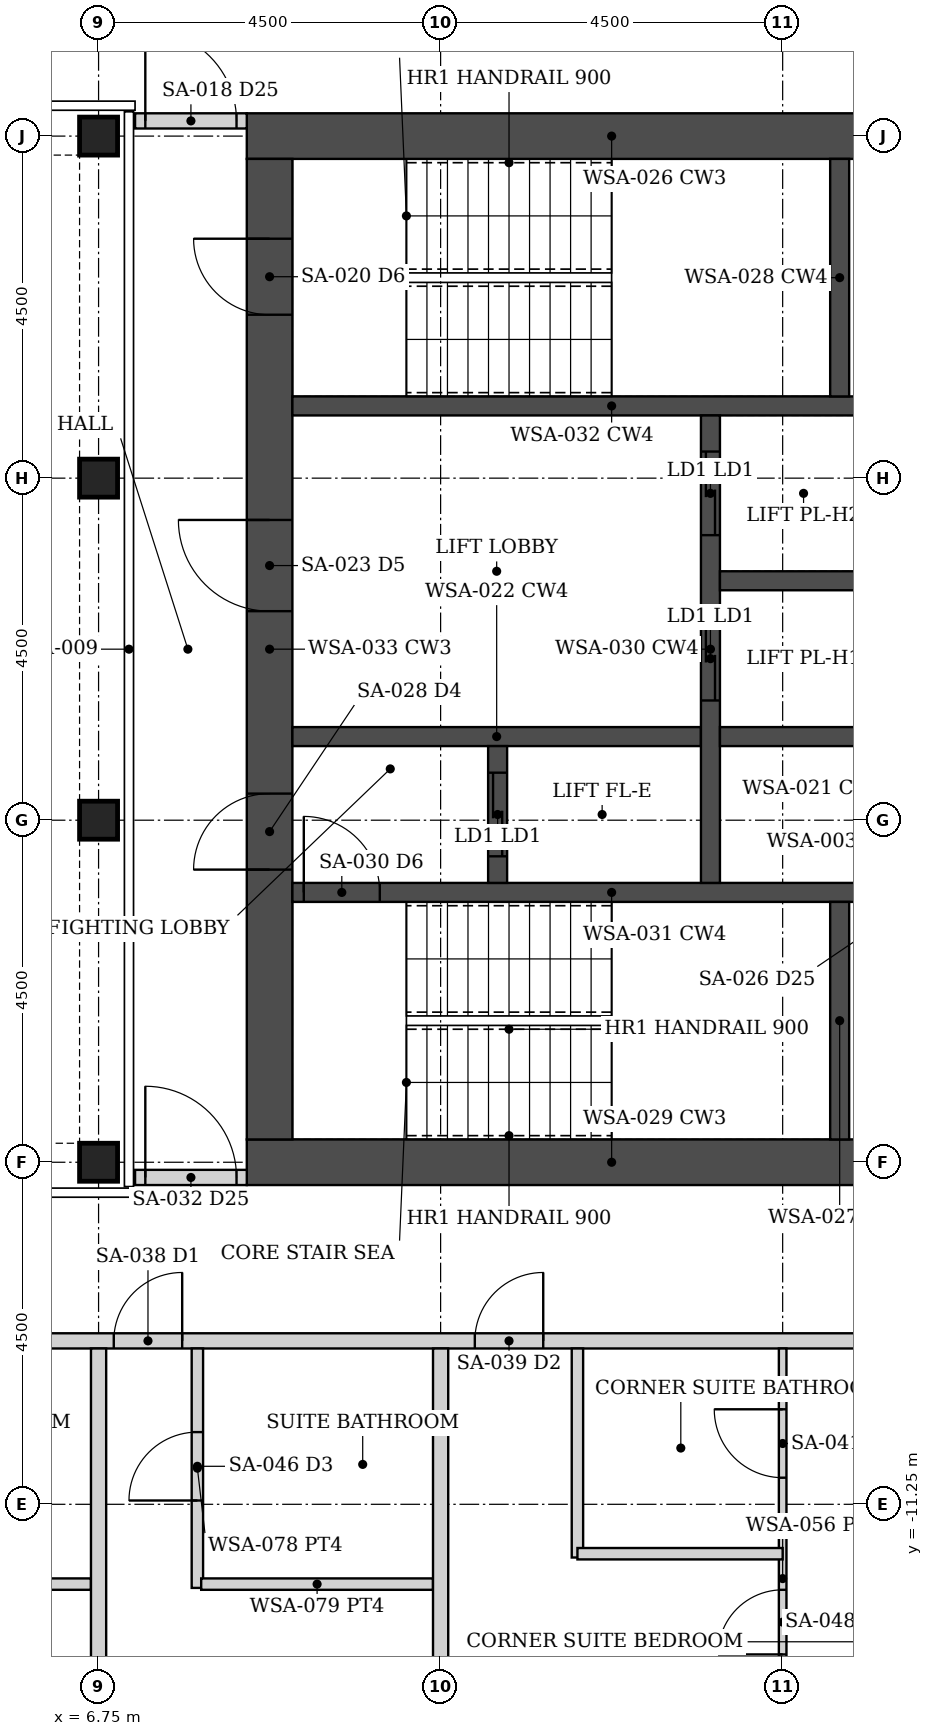
"""IFC4 building model, lengths in metres.
Left out: names, types, materials, properties, quantities, classifications, styles, units other than length and angle.
Written with IfcOpenShell. Run it as: python <this file> out.ifc"""

import sys

from ifc_helpers import new_model, si_unit, direction, frame, frame_2d, origin, origin_2d, place, context, subcontext, project, spatial, rectangle, hollow_rectangle, extrude, element, fill, save


model = new_model("IFC4")
c1 = context("Model", 3, precision=1e-05, world=origin(), true_north=direction((0.0, 1.0)))
c2 = subcontext(c1, "Body", "Model", "MODEL_VIEW")
j1 = project(units=[si_unit("LENGTHUNIT", "METRE"), si_unit("PLANEANGLEUNIT", "RADIAN")], contexts=[c1])
p1 = place(None, origin())
s1 = spatial("IfcSite", under=j1, at=p1, CompositionType="ELEMENT")
p2 = place(p1, origin())
s2 = spatial("IfcBuilding", under=s1, at=p2, CompositionType="ELEMENT")
p3 = place(p2, frame((0.0, 0.0, 200.8)))
s3 = spatial("IfcBuildingStorey", under=s2, at=p3, CompositionType="ELEMENT", Elevation=200.8)
for number, where, z_axis, x_axis in (
    (1, (6.75, -6.75, 0.0), (0.0, 0.0, 1.0), (1.0, 0.0, 0.0)),
    (2, (6.75, -2.25, 0.0), (0.0, 0.0, 1.0), (1.0, 0.0, 0.0)),
    (3, (6.75, 2.25, 0.0), (0.0, 0.0, 1.0), (1.0, 0.0, 0.0)),
    (4, (6.75, 6.75, 0.0), (0.0, 0.0, 1.0), (1.0, 0.0, 0.0)),
):
    element("IfcColumn", number, at=place(p3, frame(where, z_axis=z_axis, x_axis=x_axis)), inside=s3, PredefinedType="COLUMN", context=c2, shape_type="SweptSolid", body=[
        extrude(hollow_rectangle(XDim=0.5, YDim=0.5, WallThickness=0.03, at=origin_2d()), origin(), (0.0, 0.0, 1.0), 3.75),
    ])
for number, where, z_axis, x_axis in (
    (5, (8.7, -6.75, 0.0), (0.0, 0.0, 1.0), (1.0, 0.0, 0.0)),
    (6, (8.7, 6.75, 0.0), (0.0, 0.0, 1.0), (1.0, 0.0, 0.0)),
):
    element("IfcWall", number, at=place(p3, frame(where, z_axis=z_axis, x_axis=x_axis)), inside=s3, PredefinedType="SHEAR", context=c2, shape_type="SweptSolid", body=[
        extrude(rectangle(XDim=9.6, YDim=0.6, at=frame_2d((4.8, 0.0))), origin(), (0.0, 0.0, 1.0), 3.75),
    ])
p4 = place(p3, frame((9.0, -6.45, 0.0), z_axis=(0.0, 0.0, 1.0), x_axis=(0.0, 1.0, 0.0)))
e7 = element("IfcWall", 7, at=p4, inside=s3, PredefinedType="SHEAR", context=c2, shape_type="SweptSolid", body=[
    extrude(rectangle(XDim=12.9, YDim=0.6, at=frame_2d((6.45, 0.0))), origin(), (0.0, 0.0, 1.0), 3.75),
])
p5 = place(p4, frame((3.55, 0.0, 0.0)))
e8 = element("IfcOpeningElement", 8, at=p5, cuts=e7, PredefinedType="OPENING", context=c2, shape_type="SweptSolid", body=[
    extrude(rectangle(XDim=1.0, YDim=2.1, at=frame_2d((0.5, 1.05))), frame((0.0, 0.31, 0.0), z_axis=(0.0, -1.0, 0.0), x_axis=(1.0, 0.0, 0.0)), (0.0, 0.0, 1.0), 0.62),
])
p6 = place(p4, frame((6.95, 0.0, 0.0)))
e9 = element("IfcOpeningElement", 9, at=p6, cuts=e7, PredefinedType="OPENING", context=c2, shape_type="SweptSolid", body=[
    extrude(rectangle(XDim=1.2, YDim=2.1, at=frame_2d((0.6, 1.05))), frame((0.0, 0.31, 0.0), z_axis=(0.0, -1.0, 0.0), x_axis=(1.0, 0.0, 0.0)), (0.0, 0.0, 1.0), 0.62),
])
p7 = place(p4, frame((10.85, 0.0, 0.0)))
e10 = element("IfcOpeningElement", 10, at=p7, cuts=e7, PredefinedType="OPENING", context=c2, shape_type="SweptSolid", body=[
    extrude(rectangle(XDim=1.0, YDim=2.1, at=frame_2d((0.5, 1.05))), frame((0.0, 0.31, 0.0), z_axis=(0.0, -1.0, 0.0), x_axis=(1.0, 0.0, 0.0)), (0.0, 0.0, 1.0), 0.62),
])
p8 = place(p3, frame((9.3, -3.2, 0.0), z_axis=(0.0, 0.0, 1.0), x_axis=(1.0, 0.0, 0.0)))
e11 = element("IfcWall", 11, at=p8, inside=s3, PredefinedType="SHEAR", context=c2, shape_type="SweptSolid", body=[
    extrude(rectangle(XDim=8.4, YDim=0.25, at=frame_2d((4.2, 0.0))), origin(), (0.0, 0.0, 1.0), 3.75),
])
p9 = place(p8, frame((0.15, 0.0, 0.0)))
e12 = element("IfcOpeningElement", 12, at=p9, cuts=e11, PredefinedType="OPENING", context=c2, shape_type="SweptSolid", body=[
    extrude(rectangle(XDim=1.0, YDim=2.1, at=frame_2d((0.5, 1.05))), frame((0.0, 0.135, 0.0), z_axis=(0.0, -1.0, 0.0), x_axis=(1.0, 0.0, 0.0)), (0.0, 0.0, 1.0), 0.27),
])
p10 = place(p3, frame((9.3, 3.2, 0.0), z_axis=(0.0, 0.0, 1.0), x_axis=(1.0, 0.0, 0.0)))
e13 = element("IfcWall", 13, at=p10, inside=s3, PredefinedType="SHEAR", context=c2, shape_type="SweptSolid", body=[
    extrude(rectangle(XDim=8.4, YDim=0.25, at=frame_2d((4.2, 0.0))), origin(), (0.0, 0.0, 1.0), 3.75),
])
for number, where, z_axis, x_axis in (
    (14, (16.5, -6.45, 0.0), (0.0, 0.0, 1.0), (0.0, 1.0, 0.0)),
    (15, (16.5, 3.325, 0.0), (0.0, 0.0, 1.0), (0.0, 1.0, 0.0)),
):
    element("IfcWall", number, at=place(p3, frame(where, z_axis=z_axis, x_axis=x_axis)), inside=s3, PredefinedType="SHEAR", context=c2, shape_type="SweptSolid", body=[
        extrude(rectangle(XDim=3.125, YDim=0.25, at=frame_2d((1.562, 0.0))), origin(), (0.0, 0.0, 1.0), 3.75),
    ])
p11 = place(p3, frame((9.3, -1.15, 0.0), z_axis=(0.0, 0.0, 1.0), x_axis=(1.0, 0.0, 0.0)))
e16 = element("IfcWall", 16, at=p11, inside=s3, PredefinedType="SHEAR", context=c2, shape_type="SweptSolid", body=[
    extrude(rectangle(XDim=5.375, YDim=0.25, at=frame_2d((2.688, 0.0))), origin(), (0.0, 0.0, 1.0), 3.75),
])
p12 = place(p3, frame((12.0, -3.075, 0.0), z_axis=(0.0, 0.0, 1.0), x_axis=(0.0, 1.0, 0.0)))
e17 = element("IfcWall", 17, at=p12, inside=s3, PredefinedType="SHEAR", context=c2, shape_type="SweptSolid", body=[
    extrude(rectangle(XDim=1.8, YDim=0.25, at=frame_2d((0.9, 0.0))), origin(), (0.0, 0.0, 1.0), 3.75),
])
p13 = place(p12, frame((0.35, 0.0, 0.0)))
e18 = element("IfcOpeningElement", 18, at=p13, cuts=e17, PredefinedType="OPENING", context=c2, shape_type="SweptSolid", body=[
    extrude(rectangle(XDim=1.1, YDim=2.1, at=frame_2d((0.55, 1.05))), frame((0.0, 0.135, 0.0), z_axis=(0.0, -1.0, 0.0), x_axis=(1.0, 0.0, 0.0)), (0.0, 0.0, 1.0), 0.27),
])
p14 = place(p3, frame((14.8, -3.075, 0.0), z_axis=(0.0, 0.0, 1.0), x_axis=(0.0, 1.0, 0.0)))
e19 = element("IfcWall", 19, at=p14, inside=s3, PredefinedType="SHEAR", context=c2, shape_type="SweptSolid", body=[
    extrude(rectangle(XDim=6.15, YDim=0.25, at=frame_2d((3.075, 0.0))), origin(), (0.0, 0.0, 1.0), 3.75),
])
p15 = place(p14, frame((2.4, 0.0, 0.0)))
e20 = element("IfcOpeningElement", 20, at=p15, cuts=e19, PredefinedType="OPENING", context=c2, shape_type="SweptSolid", body=[
    extrude(rectangle(XDim=1.1, YDim=2.1, at=frame_2d((0.55, 1.05))), frame((0.0, 0.135, 0.0), z_axis=(0.0, -1.0, 0.0), x_axis=(1.0, 0.0, 0.0)), (0.0, 0.0, 1.0), 0.27),
])
p16 = place(p14, frame((4.575, 0.0, 0.0)))
e21 = element("IfcOpeningElement", 21, at=p16, cuts=e19, PredefinedType="OPENING", context=c2, shape_type="SweptSolid", body=[
    extrude(rectangle(XDim=1.1, YDim=2.1, at=frame_2d((0.55, 1.05))), frame((0.0, 0.135, 0.0), z_axis=(0.0, -1.0, 0.0), x_axis=(1.0, 0.0, 0.0)), (0.0, 0.0, 1.0), 0.27),
])
for number, where, z_axis, x_axis in (
    (22, (14.925, -1.15, 0.0), (0.0, 0.0, 1.0), (1.0, 0.0, 0.0)),
    (23, (14.925, 0.9, 0.0), (0.0, 0.0, 1.0), (1.0, 0.0, 0.0)),
):
    element("IfcWall", number, at=place(p3, frame(where, z_axis=z_axis, x_axis=x_axis)), inside=s3, PredefinedType="SHEAR", context=c2, shape_type="SweptSolid", body=[
        extrude(rectangle(XDim=2.775, YDim=0.25, at=frame_2d((1.387, 0.0))), origin(), (0.0, 0.0, 1.0), 3.75),
    ])
p17 = place(p3, frame((7.23, 6.95, 0.0), z_axis=(0.0, 0.0, 1.0), x_axis=(1.0, 0.0, 0.0)))
e24 = element("IfcWall", 24, at=p17, inside=s3, PredefinedType="PARTITIONING", context=c2, shape_type="SweptSolid", body=[
    extrude(rectangle(XDim=1.47, YDim=0.2, at=frame_2d((0.735, 0.0))), origin(), (0.0, 0.0, 1.0), 2.629),
])
p18 = place(p17, frame((0.135, 0.0, 0.0)))
e25 = element("IfcOpeningElement", 25, at=p18, cuts=e24, PredefinedType="OPENING", context=c2, shape_type="SweptSolid", body=[
    extrude(rectangle(XDim=1.2, YDim=2.1, at=frame_2d((0.6, 1.05))), frame((0.0, 0.11, 0.0), z_axis=(0.0, -1.0, 0.0), x_axis=(1.0, 0.0, 0.0)), (0.0, 0.0, 1.0), 0.22),
])
p19 = place(p3, frame((7.23, -6.95, 0.0), z_axis=(0.0, 0.0, 1.0), x_axis=(1.0, 0.0, 0.0)))
e26 = element("IfcWall", 26, at=p19, inside=s3, PredefinedType="PARTITIONING", context=c2, shape_type="SweptSolid", body=[
    extrude(rectangle(XDim=1.47, YDim=0.2, at=frame_2d((0.735, 0.0))), origin(), (0.0, 0.0, 1.0), 2.629),
])
p20 = place(p19, frame((0.135, 0.0, 0.0)))
e27 = element("IfcOpeningElement", 27, at=p20, cuts=e26, PredefinedType="OPENING", context=c2, shape_type="SweptSolid", body=[
    extrude(rectangle(XDim=1.2, YDim=2.1, at=frame_2d((0.6, 1.05))), frame((0.0, 0.11, 0.0), z_axis=(0.0, -1.0, 0.0), x_axis=(1.0, 0.0, 0.0)), (0.0, 0.0, 1.0), 0.22),
])
p21 = place(p3, frame((-20.05, -9.1, 0.0), z_axis=(0.0, 0.0, 1.0), x_axis=(1.0, 0.0, 0.0)))
e28 = element("IfcWall", 28, at=p21, inside=s3, PredefinedType="PARTITIONING", context=c2, shape_type="SweptSolid", body=[
    extrude(rectangle(XDim=40.1, YDim=0.2, at=frame_2d((20.05, 0.0))), origin(), (0.0, 0.0, 1.0), 2.629),
])
p22 = place(p21, frame((9.0, 0.0, 0.0)))
e29 = element("IfcOpeningElement", 29, at=p22, cuts=e28, PredefinedType="OPENING", context=c2, shape_type="SweptSolid", body=[
    extrude(rectangle(XDim=0.9, YDim=2.1, at=frame_2d((0.45, 1.05))), frame((0.0, 0.11, 0.0), z_axis=(0.0, -1.0, 0.0), x_axis=(1.0, 0.0, 0.0)), (0.0, 0.0, 1.0), 0.22),
])
p23 = place(p21, frame((13.5, 0.0, 0.0)))
e30 = element("IfcOpeningElement", 30, at=p23, cuts=e28, PredefinedType="OPENING", context=c2, shape_type="SweptSolid", body=[
    extrude(rectangle(XDim=0.9, YDim=2.1, at=frame_2d((0.45, 1.05))), frame((0.0, 0.11, 0.0), z_axis=(0.0, -1.0, 0.0), x_axis=(1.0, 0.0, 0.0)), (0.0, 0.0, 1.0), 0.22),
])
p24 = place(p21, frame((18.0, 0.0, 0.0)))
e31 = element("IfcOpeningElement", 31, at=p24, cuts=e28, PredefinedType="OPENING", context=c2, shape_type="SweptSolid", body=[
    extrude(rectangle(XDim=0.9, YDim=2.1, at=frame_2d((0.45, 1.05))), frame((0.0, 0.11, 0.0), z_axis=(0.0, -1.0, 0.0), x_axis=(1.0, 0.0, 0.0)), (0.0, 0.0, 1.0), 0.22),
])
p25 = place(p21, frame((22.5, 0.0, 0.0)))
e32 = element("IfcOpeningElement", 32, at=p25, cuts=e28, PredefinedType="OPENING", context=c2, shape_type="SweptSolid", body=[
    extrude(rectangle(XDim=0.9, YDim=2.1, at=frame_2d((0.45, 1.05))), frame((0.0, 0.11, 0.0), z_axis=(0.0, -1.0, 0.0), x_axis=(1.0, 0.0, 0.0)), (0.0, 0.0, 1.0), 0.22),
])
p26 = place(p21, frame((27.0, 0.0, 0.0)))
e33 = element("IfcOpeningElement", 33, at=p26, cuts=e28, PredefinedType="OPENING", context=c2, shape_type="SweptSolid", body=[
    extrude(rectangle(XDim=0.9, YDim=2.1, at=frame_2d((0.45, 1.05))), frame((0.0, 0.11, 0.0), z_axis=(0.0, -1.0, 0.0), x_axis=(1.0, 0.0, 0.0)), (0.0, 0.0, 1.0), 0.22),
])
p27 = place(p21, frame((31.75, 0.0, 0.0)))
e34 = element("IfcOpeningElement", 34, at=p27, cuts=e28, PredefinedType="OPENING", context=c2, shape_type="SweptSolid", body=[
    extrude(rectangle(XDim=0.9, YDim=2.1, at=frame_2d((0.45, 1.05))), frame((0.0, 0.11, 0.0), z_axis=(0.0, -1.0, 0.0), x_axis=(1.0, 0.0, 0.0)), (0.0, 0.0, 1.0), 0.22),
])
p28 = place(p21, frame((7.45, 0.0, 0.0)))
e35 = element("IfcOpeningElement", 35, at=p28, cuts=e28, PredefinedType="OPENING", context=c2, shape_type="SweptSolid", body=[
    extrude(rectangle(XDim=0.9, YDim=2.1, at=frame_2d((0.45, 1.05))), frame((0.0, 0.11, 0.0), z_axis=(0.0, -1.0, 0.0), x_axis=(1.0, 0.0, 0.0)), (0.0, 0.0, 1.0), 0.22),
])
p29 = place(p3, frame((3.6, -12.3, 0.0), z_axis=(0.0, 0.0, 1.0), x_axis=(1.0, 0.0, 0.0)))
e36 = element("IfcWall", 36, at=p29, inside=s3, PredefinedType="PARTITIONING", context=c2, shape_type="SweptSolid", body=[
    extrude(rectangle(XDim=3.05, YDim=0.15, at=frame_2d((1.525, 0.0))), origin(), (0.0, 0.0, 1.0), 2.629),
])
p30 = place(p3, frame((8.05, -12.35, 0.0), z_axis=(0.0, 0.0, 1.0), x_axis=(0.0, 1.0, 0.0)))
e37 = element("IfcWall", 37, at=p30, inside=s3, PredefinedType="PARTITIONING", context=c2, shape_type="SweptSolid", body=[
    extrude(rectangle(XDim=3.15, YDim=0.15, at=frame_2d((1.575, 0.0))), origin(), (0.0, 0.0, 1.0), 2.629),
])
p31 = place(p30, frame((1.15, 0.0, 0.0)))
e38 = element("IfcOpeningElement", 38, at=p31, cuts=e37, PredefinedType="OPENING", context=c2, shape_type="SweptSolid", body=[
    extrude(rectangle(XDim=0.9, YDim=2.1, at=frame_2d((0.45, 1.05))), frame((0.0, 0.085, 0.0), z_axis=(0.0, -1.0, 0.0), x_axis=(1.0, 0.0, 0.0)), (0.0, 0.0, 1.0), 0.17),
])
p32 = place(p3, frame((8.1, -12.3, 0.0), z_axis=(0.0, 0.0, 1.0), x_axis=(1.0, 0.0, 0.0)))
e39 = element("IfcWall", 39, at=p32, inside=s3, PredefinedType="PARTITIONING", context=c2, shape_type="SweptSolid", body=[
    extrude(rectangle(XDim=3.05, YDim=0.15, at=frame_2d((1.525, 0.0))), origin(), (0.0, 0.0, 1.0), 2.629),
])
for number, where, z_axis, x_axis in (
    (40, (6.75, -19.9, 0.0), (0.0, 0.0, 1.0), (0.0, 1.0, 0.0)),
    (41, (11.25, -19.9, 0.0), (0.0, 0.0, 1.0), (0.0, 1.0, 0.0)),
):
    element("IfcWall", number, at=place(p3, frame(where, z_axis=z_axis, x_axis=x_axis)), inside=s3, PredefinedType="PARTITIONING", context=c2, shape_type="SweptSolid", body=[
        extrude(rectangle(XDim=10.7, YDim=0.2, at=frame_2d((5.35, 0.0))), origin(), (0.0, 0.0, 1.0), 2.629),
    ])
p33 = place(p3, frame((15.75, -15.255, 0.0), z_axis=(0.0, 0.0, 1.0), x_axis=(0.0, 1.0, 0.0)))
e42 = element("IfcWall", 42, at=p33, inside=s3, PredefinedType="PARTITIONING", context=c2, shape_type="SweptSolid", body=[
    extrude(rectangle(XDim=6.055, YDim=0.1, at=frame_2d((3.027, 0.0))), origin(), (0.0, 0.0, 1.0), 2.629),
])
p34 = place(p33, frame((2.03, 0.0, 0.0)))
e43 = element("IfcOpeningElement", 43, at=p34, cuts=e42, PredefinedType="OPENING", context=c2, shape_type="SweptSolid", body=[
    extrude(rectangle(XDim=0.85, YDim=2.1, at=frame_2d((0.425, 1.05))), frame((0.0, 0.06, 0.0), z_axis=(0.0, -1.0, 0.0), x_axis=(1.0, 0.0, 0.0)), (0.0, 0.0, 1.0), 0.12),
])
p35 = place(p33, frame((4.355, 0.0, 0.0)))
e44 = element("IfcOpeningElement", 44, at=p35, cuts=e42, PredefinedType="OPENING", context=c2, shape_type="SweptSolid", body=[
    extrude(rectangle(XDim=0.9, YDim=2.1, at=frame_2d((0.45, 1.05))), frame((0.0, 0.06, 0.0), z_axis=(0.0, -1.0, 0.0), x_axis=(1.0, 0.0, 0.0)), (0.0, 0.0, 1.0), 0.12),
])
p36 = place(p3, frame((13.05, -11.95, 0.0), z_axis=(0.0, 0.0, 1.0), x_axis=(0.0, 1.0, 0.0)))
e45 = element("IfcWall", 45, at=p36, inside=s3, PredefinedType="PARTITIONING", context=c2, shape_type="SweptSolid", body=[
    extrude(rectangle(XDim=2.75, YDim=0.15, at=frame_2d((1.375, 0.0))), origin(), (0.0, 0.0, 1.0), 2.629),
])
p37 = place(p3, frame((13.05, -11.9, 0.0), z_axis=(0.0, 0.0, 1.0), x_axis=(1.0, 0.0, 0.0)))
e46 = element("IfcWall", 46, at=p37, inside=s3, PredefinedType="PARTITIONING", context=c2, shape_type="SweptSolid", body=[
    extrude(rectangle(XDim=2.7, YDim=0.15, at=frame_2d((1.35, 0.0))), origin(), (0.0, 0.0, 1.0), 2.629),
])
p38 = place(p18, origin())
e47 = element("IfcDoor", 47, at=p38, inside=s3, OperationType="DOUBLE_DOOR_DOUBLE_SWING", PredefinedType="DOOR", context=c2, shape_type="SweptSolid", body=[
    extrude(rectangle(XDim=1.2, YDim=2.1, at=frame_2d((0.6, 1.05))), frame((0.0, 0.025, 0.0), z_axis=(0.0, -1.0, 0.0), x_axis=(1.0, 0.0, 0.0)), (0.0, 0.0, 1.0), 0.05),
])
fill(e25, e47)
p39 = place(p20, origin())
e48 = element("IfcDoor", 48, at=p39, inside=s3, OperationType="DOUBLE_DOOR_DOUBLE_SWING", PredefinedType="DOOR", context=c2, shape_type="SweptSolid", body=[
    extrude(rectangle(XDim=1.2, YDim=2.1, at=frame_2d((0.6, 1.05))), frame((0.0, 0.025, 0.0), z_axis=(0.0, -1.0, 0.0), x_axis=(1.0, 0.0, 0.0)), (0.0, 0.0, 1.0), 0.05),
])
fill(e27, e48)
p40 = place(p26, origin())
e49 = element("IfcDoor", 49, at=p40, inside=s3, OperationType="SINGLE_SWING_RIGHT", PredefinedType="DOOR", context=c2, shape_type="SweptSolid", body=[
    extrude(rectangle(XDim=0.9, YDim=2.1, at=frame_2d((0.45, 1.05))), frame((0.0, 0.025, 0.0), z_axis=(0.0, -1.0, 0.0), x_axis=(1.0, 0.0, 0.0)), (0.0, 0.0, 1.0), 0.05),
])
fill(e33, e49)
p41 = place(p31, origin())
e50 = element("IfcDoor", 50, at=p41, inside=s3, OperationType="SINGLE_SWING_LEFT", PredefinedType="DOOR", context=c2, shape_type="SweptSolid", body=[
    extrude(rectangle(XDim=0.9, YDim=2.1, at=frame_2d((0.45, 1.05))), frame((0.0, 0.025, 0.0), z_axis=(0.0, -1.0, 0.0), x_axis=(1.0, 0.0, 0.0)), (0.0, 0.0, 1.0), 0.05),
])
fill(e38, e50)
p42 = place(p27, origin())
e51 = element("IfcDoor", 51, at=p42, inside=s3, OperationType="SINGLE_SWING_RIGHT", PredefinedType="DOOR", context=c2, shape_type="SweptSolid", body=[
    extrude(rectangle(XDim=0.9, YDim=2.1, at=frame_2d((0.45, 1.05))), frame((0.0, 0.025, 0.0), z_axis=(0.0, -1.0, 0.0), x_axis=(1.0, 0.0, 0.0)), (0.0, 0.0, 1.0), 0.05),
])
fill(e34, e51)
p43 = place(p34, origin())
e52 = element("IfcDoor", 52, at=p43, inside=s3, OperationType="SINGLE_SWING_LEFT", PredefinedType="DOOR", context=c2, shape_type="SweptSolid", body=[
    extrude(rectangle(XDim=0.85, YDim=2.1, at=frame_2d((0.425, 1.05))), frame((0.0, 0.025, 0.0), z_axis=(0.0, -1.0, 0.0), x_axis=(1.0, 0.0, 0.0)), (0.0, 0.0, 1.0), 0.05),
])
fill(e43, e52)
p44 = place(p35, origin())
e53 = element("IfcDoor", 53, at=p44, inside=s3, OperationType="SINGLE_SWING_RIGHT", PredefinedType="DOOR", context=c2, shape_type="SweptSolid", body=[
    extrude(rectangle(XDim=0.9, YDim=2.1, at=frame_2d((0.45, 1.05))), frame((0.0, 0.025, 0.0), z_axis=(0.0, -1.0, 0.0), x_axis=(1.0, 0.0, 0.0)), (0.0, 0.0, 1.0), 0.05),
])
fill(e44, e53)
p45 = place(p5, origin())
e54 = element("IfcDoor", 54, at=p45, inside=s3, OperationType="SINGLE_SWING_LEFT", PredefinedType="DOOR", context=c2, shape_type="SweptSolid", body=[
    extrude(rectangle(XDim=1.0, YDim=2.1, at=frame_2d((0.5, 1.05))), frame((0.0, 0.025, 0.0), z_axis=(0.0, -1.0, 0.0), x_axis=(1.0, 0.0, 0.0)), (0.0, 0.0, 1.0), 0.05),
])
fill(e8, e54)
p46 = place(p9, origin())
e55 = element("IfcDoor", 55, at=p46, inside=s3, OperationType="SINGLE_SWING_LEFT", PredefinedType="DOOR", context=c2, shape_type="SweptSolid", body=[
    extrude(rectangle(XDim=1.0, YDim=2.1, at=frame_2d((0.5, 1.05))), frame((0.0, 0.025, 0.0), z_axis=(0.0, -1.0, 0.0), x_axis=(1.0, 0.0, 0.0)), (0.0, 0.0, 1.0), 0.05),
])
fill(e12, e55)
p47 = place(p6, origin())
e56 = element("IfcDoor", 56, at=p47, inside=s3, OperationType="SINGLE_SWING_RIGHT", PredefinedType="DOOR", context=c2, shape_type="SweptSolid", body=[
    extrude(rectangle(XDim=1.2, YDim=2.1, at=frame_2d((0.6, 1.05))), frame((0.0, 0.025, 0.0), z_axis=(0.0, -1.0, 0.0), x_axis=(1.0, 0.0, 0.0)), (0.0, 0.0, 1.0), 0.05),
])
fill(e9, e56)
p48 = place(p7, origin())
e57 = element("IfcDoor", 57, at=p48, inside=s3, OperationType="SINGLE_SWING_RIGHT", PredefinedType="DOOR", context=c2, shape_type="SweptSolid", body=[
    extrude(rectangle(XDim=1.0, YDim=2.1, at=frame_2d((0.5, 1.05))), frame((0.0, 0.025, 0.0), z_axis=(0.0, -1.0, 0.0), x_axis=(1.0, 0.0, 0.0)), (0.0, 0.0, 1.0), 0.05),
])
fill(e10, e57)
p49 = place(p13, origin())
e58 = element("IfcDoor", 58, at=p49, inside=s3, OperationType="DOUBLE_DOOR_SLIDING", PredefinedType="DOOR", context=c2, shape_type="SweptSolid", body=[
    extrude(rectangle(XDim=1.1, YDim=2.1, at=frame_2d((0.55, 1.05))), frame((0.0, 0.025, 0.0), z_axis=(0.0, -1.0, 0.0), x_axis=(1.0, 0.0, 0.0)), (0.0, 0.0, 1.0), 0.05),
])
fill(e18, e58)
p50 = place(p15, origin())
e59 = element("IfcDoor", 59, at=p50, inside=s3, OperationType="DOUBLE_DOOR_SLIDING", PredefinedType="DOOR", context=c2, shape_type="SweptSolid", body=[
    extrude(rectangle(XDim=1.1, YDim=2.1, at=frame_2d((0.55, 1.05))), frame((0.0, 0.025, 0.0), z_axis=(0.0, -1.0, 0.0), x_axis=(1.0, 0.0, 0.0)), (0.0, 0.0, 1.0), 0.05),
])
fill(e20, e59)
p51 = place(p16, origin())
e60 = element("IfcDoor", 60, at=p51, inside=s3, OperationType="DOUBLE_DOOR_SLIDING", PredefinedType="DOOR", context=c2, shape_type="SweptSolid", body=[
    extrude(rectangle(XDim=1.1, YDim=2.1, at=frame_2d((0.55, 1.05))), frame((0.0, 0.025, 0.0), z_axis=(0.0, -1.0, 0.0), x_axis=(1.0, 0.0, 0.0)), (0.0, 0.0, 1.0), 0.05),
])
fill(e21, e60)
save(model, sys.argv[1])
